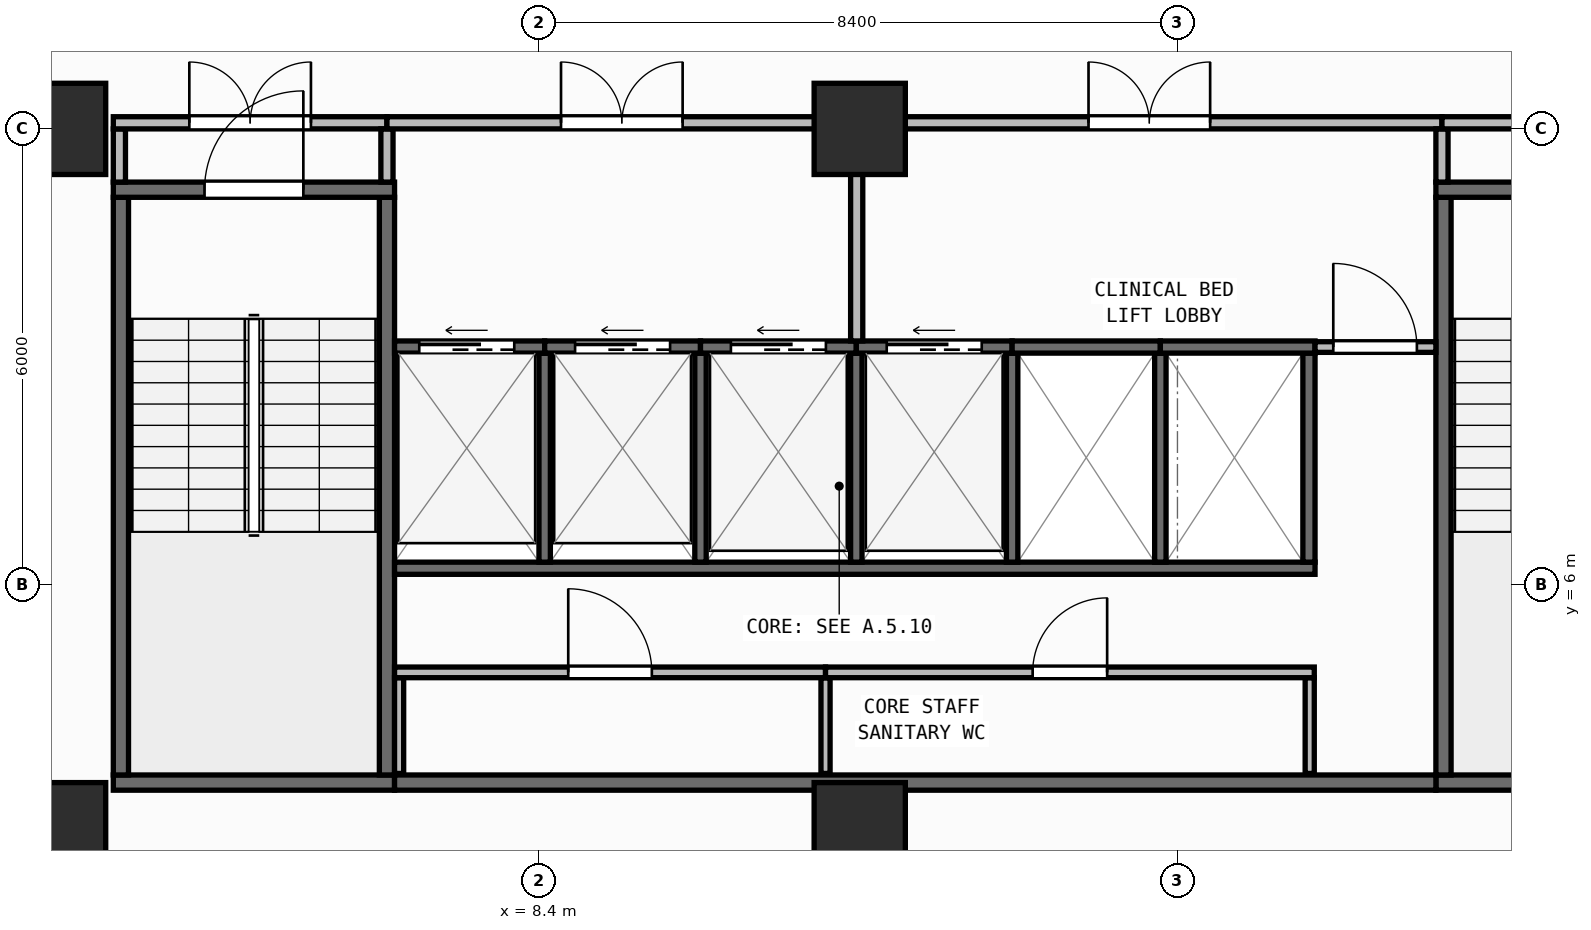
"""IFC4 building model, lengths in metres.
Left out: names, types, materials, properties, quantities, classifications, styles, units other than length and angle.
Written with IfcOpenShell. Run it as: python <this file> out.ifc"""

import sys

from ifc_helpers import new_model, si_unit, direction, frame, frame_2d, origin, origin_2d, place, context, subcontext, project, spatial, rectangle, extrude, element, fill, save


model = new_model("IFC4")
c1 = context("Model", 3, precision=1e-05, world=origin(), true_north=direction((0.0, 1.0)))
c2 = subcontext(c1, "Body", "Model", "MODEL_VIEW")
j1 = project(units=[si_unit("LENGTHUNIT", "METRE"), si_unit("PLANEANGLEUNIT", "RADIAN")], contexts=[c1])
p1 = place(None, origin())
s1 = spatial("IfcSite", under=j1, at=p1, CompositionType="ELEMENT")
p2 = place(p1, origin())
s2 = spatial("IfcBuilding", under=s1, at=p2, CompositionType="ELEMENT")
p3 = place(p2, frame((0.0, 0.0, 162.6)))
s3 = spatial("IfcBuildingStorey", under=s2, at=p3, CompositionType="ELEMENT", Elevation=162.6)
for number, where, z_axis, x_axis in (
    (1, (2.1, 2.8, 0.0), (0.0, 0.0, 1.0), (1.0, 0.0, 0.0)),
    (2, (12.62, 2.8, 0.0), (0.0, 0.0, 1.0), (1.0, 0.0, 0.0)),
    (3, (2.1, 12.0, 0.0), (0.0, 0.0, 1.0), (1.0, 0.0, 0.0)),
    (4, (12.62, 12.0, 0.0), (0.0, 0.0, 1.0), (1.0, 0.0, 0.0)),
):
    element("IfcColumn", number, at=place(p3, frame(where, z_axis=z_axis, x_axis=x_axis)), inside=s3, PredefinedType="COLUMN", context=c2, shape_type="SweptSolid", body=[
        extrude(rectangle(XDim=1.2, YDim=1.2, at=origin_2d()), origin(), (0.0, 0.0, 1.0), 3.95),
    ])
p4 = place(p3, frame((2.76, 0.173, 0.0), z_axis=(0.0, 0.0, 1.0), x_axis=(0.996857931723, 0.079210251617, 0.0)))
e5 = element("IfcWall", 5, at=p4, inside=s3, PredefinedType="STANDARD", context=c2, shape_type="SweptSolid", body=[
    extrude(rectangle(XDim=51.442, YDim=0.26, at=frame_2d((25.721, 0.0))), origin(), (0.0, 0.0, 1.0), 3.71),
])
p5 = place(p4, frame((24.521, 0.0, 0.9)))
e6 = element("IfcOpeningElement", 6, at=p5, cuts=e5, PredefinedType="OPENING", context=c2, shape_type="SweptSolid", body=[
    extrude(rectangle(XDim=2.4, YDim=1.65, at=frame_2d((1.2, 0.825))), frame((0.0, 0.14, 0.0), z_axis=(0.0, -1.0, 0.0), x_axis=(1.0, 0.0, 0.0)), (0.0, 0.0, 1.0), 0.28),
])
p6 = place(p3, frame((2.8, 3.4, 0.0), z_axis=(0.0, 0.0, 1.0), x_axis=(1.0, 0.0, 0.0)))
e7 = element("IfcWall", 7, at=p6, inside=s3, PredefinedType="SHEAR", context=c2, shape_type="SweptSolid", body=[
    extrude(rectangle(XDim=3.7, YDim=0.2, at=frame_2d((1.85, 0.0))), origin(), (0.0, 0.0, 1.0), 3.71),
])
for number, where, z_axis, x_axis in (
    (8, (2.9, 3.5, 0.0), (0.0, 0.0, 1.0), (0.0, 1.0, 0.0)),
    (9, (6.4, 3.5, 0.0), (0.0, 0.0, 1.0), (0.0, 1.0, 0.0)),
):
    element("IfcWall", number, at=place(p3, frame(where, z_axis=z_axis, x_axis=x_axis)), inside=s3, PredefinedType="SHEAR", context=c2, shape_type="SweptSolid", body=[
        extrude(rectangle(XDim=7.6, YDim=0.2, at=frame_2d((3.8, 0.0))), origin(), (0.0, 0.0, 1.0), 3.71),
    ])
p7 = place(p3, frame((2.8, 11.2, 0.0), z_axis=(0.0, 0.0, 1.0), x_axis=(1.0, 0.0, 0.0)))
e10 = element("IfcWall", 10, at=p7, inside=s3, PredefinedType="SHEAR", context=c2, shape_type="SweptSolid", body=[
    extrude(rectangle(XDim=3.7, YDim=0.2, at=frame_2d((1.85, 0.0))), origin(), (0.0, 0.0, 1.0), 3.71),
])
p8 = place(p7, frame((1.2, 0.0, 0.0)))
e11 = element("IfcOpeningElement", 11, at=p8, cuts=e10, PredefinedType="OPENING", context=c2, shape_type="SweptSolid", body=[
    extrude(rectangle(XDim=1.3, YDim=2.15, at=frame_2d((0.65, 1.075))), frame((0.0, 0.11, 0.0), z_axis=(0.0, -1.0, 0.0), x_axis=(1.0, 0.0, 0.0)), (0.0, 0.0, 1.0), 0.22),
])
p9 = place(p3, frame((20.2, 3.4, 0.0), z_axis=(0.0, 0.0, 1.0), x_axis=(1.0, 0.0, 0.0)))
e12 = element("IfcWall", 12, at=p9, inside=s3, PredefinedType="SHEAR", context=c2, shape_type="SweptSolid", body=[
    extrude(rectangle(XDim=3.7, YDim=0.2, at=frame_2d((1.85, 0.0))), origin(), (0.0, 0.0, 1.0), 3.71),
])
p10 = place(p3, frame((20.3, 3.5, 0.0), z_axis=(0.0, 0.0, 1.0), x_axis=(0.0, 1.0, 0.0)))
e13 = element("IfcWall", 13, at=p10, inside=s3, PredefinedType="SHEAR", context=c2, shape_type="SweptSolid", body=[
    extrude(rectangle(XDim=7.6, YDim=0.2, at=frame_2d((3.8, 0.0))), origin(), (0.0, 0.0, 1.0), 3.71),
])
p11 = place(p3, frame((20.2, 11.2, 0.0), z_axis=(0.0, 0.0, 1.0), x_axis=(1.0, 0.0, 0.0)))
e14 = element("IfcWall", 14, at=p11, inside=s3, PredefinedType="SHEAR", context=c2, shape_type="SweptSolid", body=[
    extrude(rectangle(XDim=3.7, YDim=0.2, at=frame_2d((1.85, 0.0))), origin(), (0.0, 0.0, 1.0), 3.71),
])
p12 = place(p11, frame((1.2, 0.0, 0.0)))
e15 = element("IfcOpeningElement", 15, at=p12, cuts=e14, PredefinedType="OPENING", context=c2, shape_type="SweptSolid", body=[
    extrude(rectangle(XDim=1.3, YDim=2.15, at=frame_2d((0.65, 1.075))), frame((0.0, 0.11, 0.0), z_axis=(0.0, -1.0, 0.0), x_axis=(1.0, 0.0, 0.0)), (0.0, 0.0, 1.0), 0.22),
])
p13 = place(p3, frame((6.5, 3.4, 0.0), z_axis=(0.0, 0.0, 1.0), x_axis=(1.0, 0.0, 0.0)))
e16 = element("IfcWall", 16, at=p13, inside=s3, PredefinedType="SHEAR", context=c2, shape_type="SweptSolid", body=[
    extrude(rectangle(XDim=13.7, YDim=0.2, at=frame_2d((6.85, 0.0))), origin(), (0.0, 0.0, 1.0), 3.71),
])
p14 = place(p3, frame((6.5, 6.22, 0.0), z_axis=(0.0, 0.0, 1.0), x_axis=(1.0, 0.0, 0.0)))
e17 = element("IfcWall", 17, at=p14, inside=s3, PredefinedType="SHEAR", context=c2, shape_type="SweptSolid", body=[
    extrude(rectangle(XDim=12.11, YDim=0.16, at=frame_2d((6.055, 0.0))), origin(), (0.0, 0.0, 1.0), 3.71),
])
p15 = place(p3, frame((18.53, 6.3, 0.0), z_axis=(0.0, 0.0, 1.0), x_axis=(0.0, 1.0, 0.0)))
e18 = element("IfcWall", 18, at=p15, inside=s3, PredefinedType="SHEAR", context=c2, shape_type="SweptSolid", body=[
    extrude(rectangle(XDim=2.75, YDim=0.16, at=frame_2d((1.375, 0.0))), origin(), (0.0, 0.0, 1.0), 3.71),
])
for number, where, z_axis, x_axis in (
    (19, (8.475, 6.3, 0.0), (0.0, 0.0, 1.0), (0.0, 1.0, 0.0)),
    (20, (10.525, 6.3, 0.0), (0.0, 0.0, 1.0), (0.0, 1.0, 0.0)),
    (21, (12.575, 6.3, 0.0), (0.0, 0.0, 1.0), (0.0, 1.0, 0.0)),
    (22, (14.625, 6.3, 0.0), (0.0, 0.0, 1.0), (0.0, 1.0, 0.0)),
    (23, (16.575, 6.3, 0.0), (0.0, 0.0, 1.0), (0.0, 1.0, 0.0)),
):
    element("IfcWall", number, at=place(p3, frame(where, z_axis=z_axis, x_axis=x_axis)), inside=s3, PredefinedType="SHEAR", context=c2, shape_type="SweptSolid", body=[
        extrude(rectangle(XDim=2.75, YDim=0.15, at=frame_2d((1.375, 0.0))), origin(), (0.0, 0.0, 1.0), 3.71),
    ])
p16 = place(p3, frame((6.5, 9.13, 0.0), z_axis=(0.0, 0.0, 1.0), x_axis=(1.0, 0.0, 0.0)))
e24 = element("IfcWall", 24, at=p16, inside=s3, PredefinedType="SHEAR", context=c2, shape_type="SweptSolid", body=[
    extrude(rectangle(XDim=1.975, YDim=0.16, at=frame_2d((0.988, 0.0))), origin(), (0.0, 0.0, 1.0), 3.71),
])
p17 = place(p16, frame((0.325, 0.0, 0.0)))
e25 = element("IfcOpeningElement", 25, at=p17, cuts=e24, PredefinedType="OPENING", context=c2, shape_type="SweptSolid", body=[
    extrude(rectangle(XDim=1.25, YDim=2.15, at=frame_2d((0.625, 1.075))), frame((0.0, 0.09, 0.0), z_axis=(0.0, -1.0, 0.0), x_axis=(1.0, 0.0, 0.0)), (0.0, 0.0, 1.0), 0.18),
])
p18 = place(p3, frame((8.475, 9.13, 0.0), z_axis=(0.0, 0.0, 1.0), x_axis=(1.0, 0.0, 0.0)))
e26 = element("IfcWall", 26, at=p18, inside=s3, PredefinedType="SHEAR", context=c2, shape_type="SweptSolid", body=[
    extrude(rectangle(XDim=2.05, YDim=0.16, at=frame_2d((1.025, 0.0))), origin(), (0.0, 0.0, 1.0), 3.71),
])
p19 = place(p18, frame((0.4, 0.0, 0.0)))
e27 = element("IfcOpeningElement", 27, at=p19, cuts=e26, PredefinedType="OPENING", context=c2, shape_type="SweptSolid", body=[
    extrude(rectangle(XDim=1.25, YDim=2.15, at=frame_2d((0.625, 1.075))), frame((0.0, 0.09, 0.0), z_axis=(0.0, -1.0, 0.0), x_axis=(1.0, 0.0, 0.0)), (0.0, 0.0, 1.0), 0.18),
])
p20 = place(p3, frame((10.525, 9.13, 0.0), z_axis=(0.0, 0.0, 1.0), x_axis=(1.0, 0.0, 0.0)))
e28 = element("IfcWall", 28, at=p20, inside=s3, PredefinedType="SHEAR", context=c2, shape_type="SweptSolid", body=[
    extrude(rectangle(XDim=2.05, YDim=0.16, at=frame_2d((1.025, 0.0))), origin(), (0.0, 0.0, 1.0), 3.71),
])
p21 = place(p20, frame((0.4, 0.0, 0.0)))
e29 = element("IfcOpeningElement", 29, at=p21, cuts=e28, PredefinedType="OPENING", context=c2, shape_type="SweptSolid", body=[
    extrude(rectangle(XDim=1.25, YDim=2.15, at=frame_2d((0.625, 1.075))), frame((0.0, 0.09, 0.0), z_axis=(0.0, -1.0, 0.0), x_axis=(1.0, 0.0, 0.0)), (0.0, 0.0, 1.0), 0.18),
])
p22 = place(p3, frame((12.575, 9.13, 0.0), z_axis=(0.0, 0.0, 1.0), x_axis=(1.0, 0.0, 0.0)))
e30 = element("IfcWall", 30, at=p22, inside=s3, PredefinedType="SHEAR", context=c2, shape_type="SweptSolid", body=[
    extrude(rectangle(XDim=2.05, YDim=0.16, at=frame_2d((1.025, 0.0))), origin(), (0.0, 0.0, 1.0), 3.71),
])
p23 = place(p22, frame((0.4, 0.0, 0.0)))
e31 = element("IfcOpeningElement", 31, at=p23, cuts=e30, PredefinedType="OPENING", context=c2, shape_type="SweptSolid", body=[
    extrude(rectangle(XDim=1.25, YDim=2.15, at=frame_2d((0.625, 1.075))), frame((0.0, 0.09, 0.0), z_axis=(0.0, -1.0, 0.0), x_axis=(1.0, 0.0, 0.0)), (0.0, 0.0, 1.0), 0.18),
])
p24 = place(p3, frame((14.625, 9.13, 0.0), z_axis=(0.0, 0.0, 1.0), x_axis=(1.0, 0.0, 0.0)))
e32 = element("IfcWall", 32, at=p24, inside=s3, PredefinedType="SHEAR", context=c2, shape_type="SweptSolid", body=[
    extrude(rectangle(XDim=1.95, YDim=0.16, at=frame_2d((0.975, 0.0))), origin(), (0.0, 0.0, 1.0), 3.71),
])
p25 = place(p3, frame((16.575, 9.13, 0.0), z_axis=(0.0, 0.0, 1.0), x_axis=(1.0, 0.0, 0.0)))
e33 = element("IfcWall", 33, at=p25, inside=s3, PredefinedType="SHEAR", context=c2, shape_type="SweptSolid", body=[
    extrude(rectangle(XDim=2.035, YDim=0.16, at=frame_2d((1.018, 0.0))), origin(), (0.0, 0.0, 1.0), 3.71),
])
for number, where, z_axis, x_axis in (
    (34, (6.56, 3.52, 0.0), (0.0, 0.0, 1.0), (0.0, 1.0, 0.0)),
    (35, (12.17, 3.52, 0.0), (0.0, 0.0, 1.0), (0.0, 1.0, 0.0)),
    (36, (18.54, 3.52, 0.0), (0.0, 0.0, 1.0), (0.0, 1.0, 0.0)),
):
    element("IfcWall", number, at=place(p3, frame(where, z_axis=z_axis, x_axis=x_axis)), inside=s3, PredefinedType="PARTITIONING", context=c2, shape_type="SweptSolid", body=[
        extrude(rectangle(XDim=1.26, YDim=0.12, at=frame_2d((0.63, 0.0))), origin(), (0.0, 0.0, 1.0), 3.71),
    ])
p26 = place(p3, frame((6.5, 4.85, 0.0), z_axis=(0.0, 0.0, 1.0), x_axis=(1.0, 0.0, 0.0)))
e37 = element("IfcWall", 37, at=p26, inside=s3, PredefinedType="PARTITIONING", context=c2, shape_type="SweptSolid", body=[
    extrude(rectangle(XDim=5.67, YDim=0.14, at=frame_2d((2.835, 0.0))), origin(), (0.0, 0.0, 1.0), 3.71),
])
p27 = place(p26, frame((2.285, 0.0, 0.0)))
e38 = element("IfcOpeningElement", 38, at=p27, cuts=e37, PredefinedType="OPENING", context=c2, shape_type="SweptSolid", body=[
    extrude(rectangle(XDim=1.1, YDim=2.1, at=frame_2d((0.55, 1.05))), frame((0.0, 0.08, 0.0), z_axis=(0.0, -1.0, 0.0), x_axis=(1.0, 0.0, 0.0)), (0.0, 0.0, 1.0), 0.16),
])
p28 = place(p3, frame((12.17, 4.85, 0.0), z_axis=(0.0, 0.0, 1.0), x_axis=(1.0, 0.0, 0.0)))
e39 = element("IfcWall", 39, at=p28, inside=s3, PredefinedType="PARTITIONING", context=c2, shape_type="SweptSolid", body=[
    extrude(rectangle(XDim=6.43, YDim=0.14, at=frame_2d((3.215, 0.0))), origin(), (0.0, 0.0, 1.0), 3.71),
])
p29 = place(p28, frame((2.725, 0.0, 0.0)))
e40 = element("IfcOpeningElement", 40, at=p29, cuts=e39, PredefinedType="OPENING", context=c2, shape_type="SweptSolid", body=[
    extrude(rectangle(XDim=0.98, YDim=2.1, at=frame_2d((0.49, 1.05))), frame((0.0, 0.08, 0.0), z_axis=(0.0, -1.0, 0.0), x_axis=(1.0, 0.0, 0.0)), (0.0, 0.0, 1.0), 0.16),
])
p30 = place(p3, frame((18.61, 9.13, 0.0), z_axis=(0.0, 0.0, 1.0), x_axis=(1.0, 0.0, 0.0)))
e41 = element("IfcWall", 41, at=p30, inside=s3, PredefinedType="PARTITIONING", context=c2, shape_type="SweptSolid", body=[
    extrude(rectangle(XDim=1.59, YDim=0.14, at=frame_2d((0.795, 0.0))), origin(), (0.0, 0.0, 1.0), 3.71),
])
p31 = place(p30, frame((0.24, 0.0, 0.0)))
e42 = element("IfcOpeningElement", 42, at=p31, cuts=e41, PredefinedType="OPENING", context=c2, shape_type="SweptSolid", body=[
    extrude(rectangle(XDim=1.1, YDim=2.1, at=frame_2d((0.55, 1.05))), frame((0.0, 0.08, 0.0), z_axis=(0.0, -1.0, 0.0), x_axis=(1.0, 0.0, 0.0)), (0.0, 0.0, 1.0), 0.16),
])
p32 = place(p3, frame((2.88, 11.3, 0.0), z_axis=(0.0, 0.0, 1.0), x_axis=(0.0, 1.0, 0.0)))
e43 = element("IfcWall", 43, at=p32, inside=s3, PredefinedType="PARTITIONING", context=c2, shape_type="SweptSolid", body=[
    extrude(rectangle(XDim=0.7, YDim=0.16, at=frame_2d((0.35, 0.0))), origin(), (0.0, 0.0, 1.0), 3.71),
])
p33 = place(p3, frame((2.8, 12.08, 0.0), z_axis=(0.0, 0.0, 1.0), x_axis=(1.0, 0.0, 0.0)))
e44 = element("IfcWall", 44, at=p33, inside=s3, PredefinedType="PARTITIONING", context=c2, shape_type="SweptSolid", body=[
    extrude(rectangle(XDim=3.6, YDim=0.16, at=frame_2d((1.8, 0.0))), origin(), (0.0, 0.0, 1.0), 3.083),
])
p34 = place(p33, frame((1.0, 0.0, 0.0)))
e45 = element("IfcOpeningElement", 45, at=p34, cuts=e44, PredefinedType="OPENING", context=c2, shape_type="SweptSolid", body=[
    extrude(rectangle(XDim=1.6, YDim=2.05, at=frame_2d((0.8, 1.025))), frame((0.0, 0.09, 0.0), z_axis=(0.0, -1.0, 0.0), x_axis=(1.0, 0.0, 0.0)), (0.0, 0.0, 1.0), 0.18),
])
p35 = place(p3, frame((6.4, 11.3, 0.0), z_axis=(0.0, 0.0, 1.0), x_axis=(0.0, 1.0, 0.0)))
e46 = element("IfcWall", 46, at=p35, inside=s3, PredefinedType="PARTITIONING", context=c2, shape_type="SweptSolid", body=[
    extrude(rectangle(XDim=0.7, YDim=0.16, at=frame_2d((0.35, 0.0))), origin(), (0.0, 0.0, 1.0), 3.71),
])
p36 = place(p3, frame((6.4, 12.08, 0.0), z_axis=(0.0, 0.0, 1.0), x_axis=(1.0, 0.0, 0.0)))
e47 = element("IfcWall", 47, at=p36, inside=s3, PredefinedType="PARTITIONING", context=c2, shape_type="SweptSolid", body=[
    extrude(rectangle(XDim=6.18, YDim=0.16, at=frame_2d((3.09, 0.0))), origin(), (0.0, 0.0, 1.0), 3.083),
])
p37 = place(p36, frame((2.29, 0.0, 0.0)))
e48 = element("IfcOpeningElement", 48, at=p37, cuts=e47, PredefinedType="OPENING", context=c2, shape_type="SweptSolid", body=[
    extrude(rectangle(XDim=1.6, YDim=2.05, at=frame_2d((0.8, 1.025))), frame((0.0, 0.09, 0.0), z_axis=(0.0, -1.0, 0.0), x_axis=(1.0, 0.0, 0.0)), (0.0, 0.0, 1.0), 0.18),
])
p38 = place(p3, frame((12.58, 9.21, 0.0), z_axis=(0.0, 0.0, 1.0), x_axis=(0.0, 1.0, 0.0)))
e49 = element("IfcWall", 49, at=p38, inside=s3, PredefinedType="PARTITIONING", context=c2, shape_type="SweptSolid", body=[
    extrude(rectangle(XDim=2.79, YDim=0.16, at=frame_2d((1.395, 0.0))), origin(), (0.0, 0.0, 1.0), 3.71),
])
p39 = place(p3, frame((12.58, 12.08, 0.0), z_axis=(0.0, 0.0, 1.0), x_axis=(1.0, 0.0, 0.0)))
e50 = element("IfcWall", 50, at=p39, inside=s3, PredefinedType="PARTITIONING", context=c2, shape_type="SweptSolid", body=[
    extrude(rectangle(XDim=7.7, YDim=0.16, at=frame_2d((3.85, 0.0))), origin(), (0.0, 0.0, 1.0), 3.083),
])
p40 = place(p39, frame((3.05, 0.0, 0.0)))
e51 = element("IfcOpeningElement", 51, at=p40, cuts=e50, PredefinedType="OPENING", context=c2, shape_type="SweptSolid", body=[
    extrude(rectangle(XDim=1.6, YDim=2.05, at=frame_2d((0.8, 1.025))), frame((0.0, 0.09, 0.0), z_axis=(0.0, -1.0, 0.0), x_axis=(1.0, 0.0, 0.0)), (0.0, 0.0, 1.0), 0.18),
])
p41 = place(p3, frame((20.28, 11.3, 0.0), z_axis=(0.0, 0.0, 1.0), x_axis=(0.0, 1.0, 0.0)))
e52 = element("IfcWall", 52, at=p41, inside=s3, PredefinedType="PARTITIONING", context=c2, shape_type="SweptSolid", body=[
    extrude(rectangle(XDim=0.7, YDim=0.16, at=frame_2d((0.35, 0.0))), origin(), (0.0, 0.0, 1.0), 3.71),
])
p42 = place(p3, frame((20.28, 12.08, 0.0), z_axis=(0.0, 0.0, 1.0), x_axis=(1.0, 0.0, 0.0)))
e53 = element("IfcWall", 53, at=p42, inside=s3, PredefinedType="PARTITIONING", context=c2, shape_type="SweptSolid", body=[
    extrude(rectangle(XDim=3.62, YDim=0.16, at=frame_2d((1.81, 0.0))), origin(), (0.0, 0.0, 1.0), 3.083),
])
p43 = place(p42, frame((1.01, 0.0, 0.0)))
e54 = element("IfcOpeningElement", 54, at=p43, cuts=e53, PredefinedType="OPENING", context=c2, shape_type="SweptSolid", body=[
    extrude(rectangle(XDim=1.6, YDim=2.05, at=frame_2d((0.8, 1.025))), frame((0.0, 0.09, 0.0), z_axis=(0.0, -1.0, 0.0), x_axis=(1.0, 0.0, 0.0)), (0.0, 0.0, 1.0), 0.18),
])
p44 = place(p8, origin())
e55 = element("IfcDoor", 55, at=p44, inside=s3, OperationType="SINGLE_SWING_RIGHT", PredefinedType="DOOR", context=c2, shape_type="SweptSolid", body=[
    extrude(rectangle(XDim=1.3, YDim=2.15, at=frame_2d((0.65, 1.075))), frame((0.0, 0.025, 0.0), z_axis=(0.0, -1.0, 0.0), x_axis=(1.0, 0.0, 0.0)), (0.0, 0.0, 1.0), 0.05),
])
fill(e11, e55)
p45 = place(p17, origin())
e56 = element("IfcDoor", 56, at=p45, inside=s3, OperationType="SLIDING_TO_LEFT", PredefinedType="DOOR", context=c2, shape_type="SweptSolid", body=[
    extrude(rectangle(XDim=1.25, YDim=2.15, at=frame_2d((0.625, 1.075))), frame((0.0, 0.025, 0.0), z_axis=(0.0, -1.0, 0.0), x_axis=(1.0, 0.0, 0.0)), (0.0, 0.0, 1.0), 0.05),
])
fill(e25, e56)
p46 = place(p19, origin())
e57 = element("IfcDoor", 57, at=p46, inside=s3, OperationType="SLIDING_TO_LEFT", PredefinedType="DOOR", context=c2, shape_type="SweptSolid", body=[
    extrude(rectangle(XDim=1.25, YDim=2.15, at=frame_2d((0.625, 1.075))), frame((0.0, 0.025, 0.0), z_axis=(0.0, -1.0, 0.0), x_axis=(1.0, 0.0, 0.0)), (0.0, 0.0, 1.0), 0.05),
])
fill(e27, e57)
p47 = place(p21, origin())
e58 = element("IfcDoor", 58, at=p47, inside=s3, OperationType="SLIDING_TO_LEFT", PredefinedType="DOOR", context=c2, shape_type="SweptSolid", body=[
    extrude(rectangle(XDim=1.25, YDim=2.15, at=frame_2d((0.625, 1.075))), frame((0.0, 0.025, 0.0), z_axis=(0.0, -1.0, 0.0), x_axis=(1.0, 0.0, 0.0)), (0.0, 0.0, 1.0), 0.05),
])
fill(e29, e58)
p48 = place(p23, origin())
e59 = element("IfcDoor", 59, at=p48, inside=s3, OperationType="SLIDING_TO_LEFT", PredefinedType="DOOR", context=c2, shape_type="SweptSolid", body=[
    extrude(rectangle(XDim=1.25, YDim=2.15, at=frame_2d((0.625, 1.075))), frame((0.0, 0.025, 0.0), z_axis=(0.0, -1.0, 0.0), x_axis=(1.0, 0.0, 0.0)), (0.0, 0.0, 1.0), 0.05),
])
fill(e31, e59)
p49 = place(p27, origin())
e60 = element("IfcDoor", 60, at=p49, inside=s3, OperationType="SINGLE_SWING_LEFT", PredefinedType="DOOR", context=c2, shape_type="SweptSolid", body=[
    extrude(rectangle(XDim=1.1, YDim=2.1, at=frame_2d((0.55, 1.05))), frame((0.0, 0.025, 0.0), z_axis=(0.0, -1.0, 0.0), x_axis=(1.0, 0.0, 0.0)), (0.0, 0.0, 1.0), 0.05),
])
fill(e38, e60)
p50 = place(p29, origin())
e61 = element("IfcDoor", 61, at=p50, inside=s3, OperationType="SINGLE_SWING_RIGHT", PredefinedType="DOOR", context=c2, shape_type="SweptSolid", body=[
    extrude(rectangle(XDim=0.98, YDim=2.1, at=frame_2d((0.49, 1.05))), frame((0.0, 0.025, 0.0), z_axis=(0.0, -1.0, 0.0), x_axis=(1.0, 0.0, 0.0)), (0.0, 0.0, 1.0), 0.05),
])
fill(e40, e61)
p51 = place(p31, origin())
e62 = element("IfcDoor", 62, at=p51, inside=s3, OperationType="SINGLE_SWING_LEFT", PredefinedType="DOOR", context=c2, shape_type="SweptSolid", body=[
    extrude(rectangle(XDim=1.1, YDim=2.1, at=frame_2d((0.55, 1.05))), frame((0.0, 0.025, 0.0), z_axis=(0.0, -1.0, 0.0), x_axis=(1.0, 0.0, 0.0)), (0.0, 0.0, 1.0), 0.05),
])
fill(e42, e62)
p52 = place(p34, origin())
e63 = element("IfcDoor", 63, at=p52, inside=s3, OperationType="DOUBLE_DOOR_SINGLE_SWING", PredefinedType="DOOR", context=c2, shape_type="SweptSolid", body=[
    extrude(rectangle(XDim=1.6, YDim=2.05, at=frame_2d((0.8, 1.025))), frame((0.0, 0.025, 0.0), z_axis=(0.0, -1.0, 0.0), x_axis=(1.0, 0.0, 0.0)), (0.0, 0.0, 1.0), 0.05),
])
fill(e45, e63)
p53 = place(p37, origin())
e64 = element("IfcDoor", 64, at=p53, inside=s3, OperationType="DOUBLE_DOOR_SINGLE_SWING", PredefinedType="DOOR", context=c2, shape_type="SweptSolid", body=[
    extrude(rectangle(XDim=1.6, YDim=2.05, at=frame_2d((0.8, 1.025))), frame((0.0, 0.025, 0.0), z_axis=(0.0, -1.0, 0.0), x_axis=(1.0, 0.0, 0.0)), (0.0, 0.0, 1.0), 0.05),
])
fill(e48, e64)
p54 = place(p40, origin())
e65 = element("IfcDoor", 65, at=p54, inside=s3, OperationType="DOUBLE_DOOR_SINGLE_SWING", PredefinedType="DOOR", context=c2, shape_type="SweptSolid", body=[
    extrude(rectangle(XDim=1.6, YDim=2.05, at=frame_2d((0.8, 1.025))), frame((0.0, 0.025, 0.0), z_axis=(0.0, -1.0, 0.0), x_axis=(1.0, 0.0, 0.0)), (0.0, 0.0, 1.0), 0.05),
])
fill(e51, e65)
save(model, sys.argv[1])
